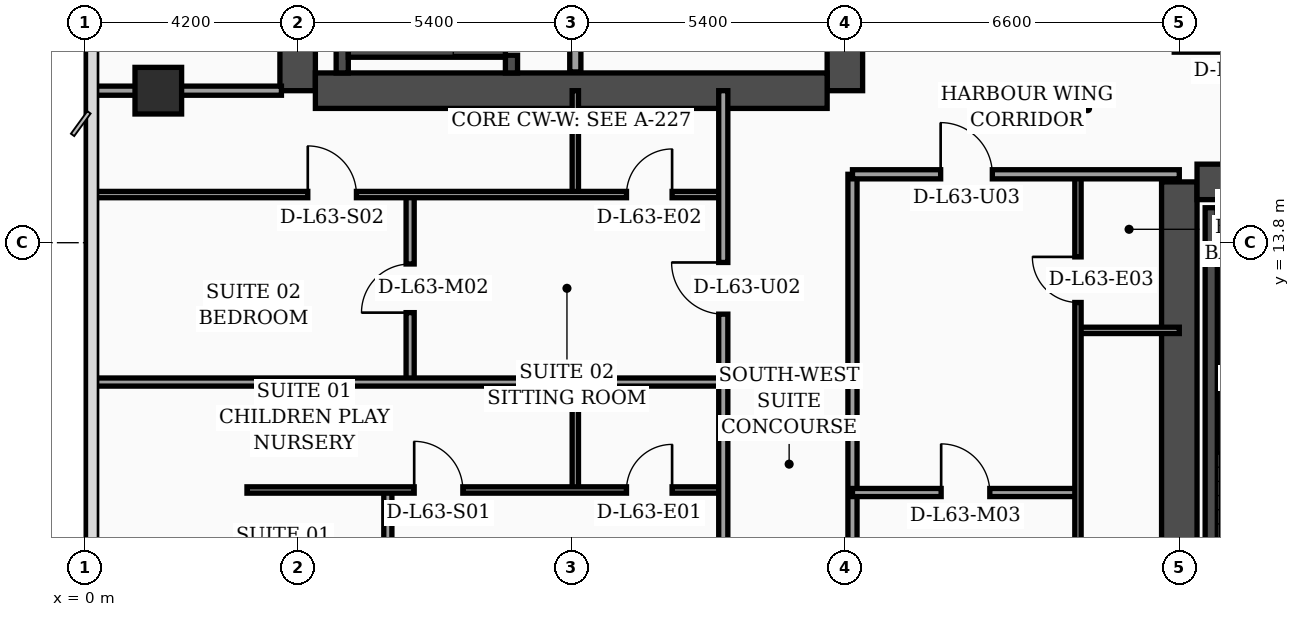
"""IFC4 building model, lengths in metres.
Left out: names, types, materials, properties, quantities, classifications, styles, units other than length and angle.
Written with IfcOpenShell. Run it as: python <this file> out.ifc"""

import sys

from ifc_helpers import new_model, si_unit, direction, frame, frame_2d, origin, origin_2d, place, context, subcontext, project, spatial, rectangle, extrude, element, fill, save


model = new_model("IFC4")
c1 = context("Model", 3, precision=1e-05, world=origin(), true_north=direction((0.0, 1.0)))
c2 = subcontext(c1, "Body", "Model", "MODEL_VIEW")
j1 = project(units=[si_unit("LENGTHUNIT", "METRE"), si_unit("PLANEANGLEUNIT", "RADIAN")], contexts=[c1])
p1 = place(None, origin())
s1 = spatial("IfcSite", under=j1, at=p1, CompositionType="ELEMENT")
p2 = place(p1, origin())
s2 = spatial("IfcBuilding", under=s1, at=p2, CompositionType="ELEMENT")
p3 = place(p2, frame((0.0, 0.0, 255.2)))
s3 = spatial("IfcBuildingStorey", under=s2, at=p3, CompositionType="ELEMENT", Elevation=255.2)
p4 = place(p3, frame((4.2, 16.8, 0.0), z_axis=(0.0, 0.0, 1.0), x_axis=(0.0, 1.0, 0.0)))
e1 = element("IfcWall", 1, at=p4, inside=s3, PredefinedType="SHEAR", context=c2, shape_type="SweptSolid", body=[
    extrude(rectangle(XDim=21.6, YDim=0.7, at=frame_2d((10.8, 0.0))), origin(), (0.0, 0.0, 1.0), 3.56),
])
p5 = place(p3, frame((15.0, 16.8, 0.0), z_axis=(0.0, 0.0, 1.0), x_axis=(0.0, 1.0, 0.0)))
e2 = element("IfcWall", 2, at=p5, inside=s3, PredefinedType="SHEAR", context=c2, shape_type="SweptSolid", body=[
    extrude(rectangle(XDim=21.6, YDim=0.7, at=frame_2d((10.8, 0.0))), origin(), (0.0, 0.0, 1.0), 3.56),
])
p6 = place(p5, frame((8.65, 0.0, 0.0)))
e3 = element("IfcOpeningElement", 3, at=p6, cuts=e2, PredefinedType="OPENING", context=c2, shape_type="SweptSolid", body=[
    extrude(rectangle(XDim=1.1, YDim=2.2, at=frame_2d((0.55, 1.1))), frame((0.0, 0.36, 0.0), z_axis=(0.0, -1.0, 0.0), x_axis=(1.0, 0.0, 0.0)), (0.0, 0.0, 1.0), 0.72),
])
p7 = place(p5, frame((18.9, 0.0, 0.0)))
e4 = element("IfcOpeningElement", 4, at=p7, cuts=e2, PredefinedType="OPENING", context=c2, shape_type="SweptSolid", body=[
    extrude(rectangle(XDim=1.1, YDim=2.2, at=frame_2d((0.55, 1.1))), frame((0.0, 0.36, 0.0), z_axis=(0.0, -1.0, 0.0), x_axis=(1.0, 0.0, 0.0)), (0.0, 0.0, 1.0), 0.72),
])
p8 = place(p3, frame((4.55, 16.8, 0.0), z_axis=(0.0, 0.0, 1.0), x_axis=(1.0, 0.0, 0.0)))
e5 = element("IfcWall", 5, at=p8, inside=s3, PredefinedType="SHEAR", context=c2, shape_type="SweptSolid", body=[
    extrude(rectangle(XDim=10.1, YDim=0.7, at=frame_2d((5.05, 0.0))), origin(), (0.0, 0.0, 1.0), 3.56),
])
p9 = place(p3, frame((21.6, 4.6, 0.0), z_axis=(0.0, 0.0, 1.0), x_axis=(0.0, 1.0, 0.0)))
e6 = element("IfcWall", 6, at=p9, inside=s3, PredefinedType="SHEAR", context=c2, shape_type="SweptSolid", body=[
    extrude(rectangle(XDim=10.4, YDim=0.7, at=frame_2d((5.2, 0.0))), origin(), (0.0, 0.0, 1.0), 3.56),
])
p10 = place(p3, frame((21.95, 15.0, 0.0), z_axis=(0.0, 0.0, 1.0), x_axis=(1.0, 0.0, 0.0)))
e7 = element("IfcWall", 7, at=p10, inside=s3, PredefinedType="SHEAR", context=c2, shape_type="SweptSolid", body=[
    extrude(rectangle(XDim=10.1, YDim=0.7, at=frame_2d((5.05, 0.0))), origin(), (0.0, 0.0, 1.0), 3.56),
])
p11 = place(p10, frame((4.95, 0.0, 0.0)))
e8 = element("IfcOpeningElement", 8, at=p11, cuts=e7, PredefinedType="OPENING", context=c2, shape_type="SweptSolid", body=[
    extrude(rectangle(XDim=1.1, YDim=2.2, at=frame_2d((0.55, 1.1))), frame((0.0, 0.36, 0.0), z_axis=(0.0, -1.0, 0.0), x_axis=(1.0, 0.0, 0.0)), (0.0, 0.0, 1.0), 0.72),
])
p12 = place(p3, frame((5.08, 17.15, 0.0), z_axis=(0.0, 0.0, 1.0), x_axis=(0.0, 1.0, 0.0)))
e9 = element("IfcWall", 9, at=p12, inside=s3, PredefinedType="SOLIDWALL", context=c2, shape_type="SweptSolid", body=[
    extrude(rectangle(XDim=9.64, YDim=0.24, at=frame_2d((4.82, 0.0))), origin(), (0.0, 0.0, 1.0), 3.56),
])
p13 = place(p3, frame((8.42, 17.15, 0.0), z_axis=(0.0, 0.0, 1.0), x_axis=(0.0, 1.0, 0.0)))
e10 = element("IfcWall", 10, at=p13, inside=s3, PredefinedType="SOLIDWALL", context=c2, shape_type="SweptSolid", body=[
    extrude(rectangle(XDim=9.64, YDim=0.24, at=frame_2d((4.82, 0.0))), origin(), (0.0, 0.0, 1.0), 3.56),
])
p14 = place(p13, frame((0.35, 0.0, 0.0)))
e11 = element("IfcOpeningElement", 11, at=p14, cuts=e10, PredefinedType="OPENING", context=c2, shape_type="SweptSolid", body=[
    extrude(rectangle(XDim=1.15, YDim=2.2, at=frame_2d((0.575, 1.1))), frame((0.0, 0.13, 0.0), z_axis=(0.0, -1.0, 0.0), x_axis=(1.0, 0.0, 0.0)), (0.0, 0.0, 1.0), 0.26),
])
p15 = place(p3, frame((5.2, 17.58, 0.0), z_axis=(0.0, 0.0, 1.0), x_axis=(1.0, 0.0, 0.0)))
e12 = element("IfcWall", 12, at=p15, inside=s3, PredefinedType="SOLIDWALL", context=c2, shape_type="SweptSolid", body=[
    extrude(rectangle(XDim=3.1, YDim=0.24, at=frame_2d((1.55, 0.0))), origin(), (0.0, 0.0, 1.0), 3.56),
])
p16 = place(p3, frame((22.23, 4.95, 0.0), z_axis=(0.0, 0.0, 1.0), x_axis=(0.0, 1.0, 0.0)))
e13 = element("IfcWall", 13, at=p16, inside=s3, PredefinedType="SOLIDWALL", context=c2, shape_type="SweptSolid", body=[
    extrude(rectangle(XDim=9.54, YDim=0.24, at=frame_2d((4.77, 0.0))), origin(), (0.0, 0.0, 1.0), 3.56),
])
p17 = place(p3, frame((22.35, 14.37, 0.0), z_axis=(0.0, 0.0, 1.0), x_axis=(1.0, 0.0, 0.0)))
e14 = element("IfcWall", 14, at=p17, inside=s3, PredefinedType="SOLIDWALL", context=c2, shape_type="SweptSolid", body=[
    extrude(rectangle(XDim=3.1, YDim=0.24, at=frame_2d((1.55, 0.0))), origin(), (0.0, 0.0, 1.0), 3.56),
])
p18 = place(p3, frame((1.45, 16.8, 0.0), z_axis=(0.0, 0.0, 1.0), x_axis=(1.0, 0.0, 0.0)))
e15 = element("IfcColumn", 15, at=p18, inside=s3, PredefinedType="COLUMN", context=c2, shape_type="SweptSolid", body=[
    extrude(rectangle(XDim=0.92, YDim=0.92, at=origin_2d()), origin(), (0.0, 0.0, 1.0), 3.56),
])
p19 = place(p3, frame((9.68, 17.17, 0.0), z_axis=(0.0, 0.0, 1.0), x_axis=(0.0, 1.0, 0.0)))
e16 = element("IfcWall", 16, at=p19, inside=s3, PredefinedType="SOLIDWALL", context=c2, shape_type="SweptSolid", body=[
    extrude(rectangle(XDim=7.83, YDim=0.22, at=frame_2d((3.915, 0.0))), origin(), (0.0, 0.0, 1.0), 3.56),
])
p20 = place(p3, frame((0.08, 16.8, 0.0), z_axis=(0.0, 0.0, 1.0), x_axis=(1.0, 0.0, 0.0)))
e17 = element("IfcWall", 17, at=p20, inside=s3, PredefinedType="PARTITIONING", context=c2, shape_type="SweptSolid", body=[
    extrude(rectangle(XDim=3.8, YDim=0.18, at=frame_2d((1.9, 0.0))), origin(), (0.0, 0.0, 1.0), 2.99),
])
p21 = place(p3, frame((9.68, 8.92, 0.0), z_axis=(0.0, 0.0, 1.0), x_axis=(0.0, 1.0, 0.0)))
e18 = element("IfcWall", 18, at=p21, inside=s3, PredefinedType="PARTITIONING", context=c2, shape_type="SweptSolid", body=[
    extrude(rectangle(XDim=2.13, YDim=0.125, at=frame_2d((1.065, 0.0))), origin(), (0.0, 0.0, 1.0), 3.09),
])
p22 = place(p3, frame((5.98, 2.44, 0.0), z_axis=(0.0, 0.0, 1.0), x_axis=(0.0, 1.0, 0.0)))
e19 = element("IfcWall", 19, at=p22, inside=s3, PredefinedType="PARTITIONING", context=c2, shape_type="SweptSolid", body=[
    extrude(rectangle(XDim=6.48, YDim=0.16, at=frame_2d((3.24, 0.0))), origin(), (0.0, 0.0, 1.0), 3.09),
])
p23 = place(p22, frame((2.76, 0.0, 0.0)))
e20 = element("IfcOpeningElement", 20, at=p23, cuts=e19, PredefinedType="OPENING", context=c2, shape_type="SweptSolid", body=[
    extrude(rectangle(XDim=0.96, YDim=2.2, at=frame_2d((0.48, 1.1))), frame((0.0, 0.09, 0.0), z_axis=(0.0, -1.0, 0.0), x_axis=(1.0, 0.0, 0.0)), (0.0, 0.0, 1.0), 0.18),
])
p24 = place(p3, frame((3.2, 8.92, 0.0), z_axis=(0.0, 0.0, 1.0), x_axis=(1.0, 0.0, 0.0)))
e21 = element("IfcWall", 21, at=p24, inside=s3, PredefinedType="PARTITIONING", context=c2, shape_type="SweptSolid", body=[
    extrude(rectangle(XDim=9.4, YDim=0.125, at=frame_2d((4.7, 0.0))), origin(), (0.0, 0.0, 1.0), 2.99),
])
p25 = place(p24, frame((3.3, 0.0, 0.0)))
e22 = element("IfcOpeningElement", 22, at=p25, cuts=e21, PredefinedType="OPENING", context=c2, shape_type="SweptSolid", body=[
    extrude(rectangle(XDim=0.96, YDim=2.2, at=frame_2d((0.48, 1.1))), frame((0.0, 0.073, 0.0), z_axis=(0.0, -1.0, 0.0), x_axis=(1.0, 0.0, 0.0)), (0.0, 0.0, 1.0), 0.145),
])
p26 = place(p24, frame((7.49, 0.0, 0.0)))
e23 = element("IfcOpeningElement", 23, at=p26, cuts=e21, PredefinedType="OPENING", context=c2, shape_type="SweptSolid", body=[
    extrude(rectangle(XDim=0.9, YDim=2.15, at=frame_2d((0.45, 1.075))), frame((0.0, 0.073, 0.0), z_axis=(0.0, -1.0, 0.0), x_axis=(1.0, 0.0, 0.0)), (0.0, 0.0, 1.0), 0.145),
])
p27 = place(p3, frame((9.68, 14.75, 0.0), z_axis=(0.0, 0.0, 1.0), x_axis=(0.0, 1.0, 0.0)))
e24 = element("IfcWall", 24, at=p27, inside=s3, PredefinedType="PARTITIONING", context=c2, shape_type="SweptSolid", body=[
    extrude(rectangle(XDim=2.05, YDim=0.125, at=frame_2d((1.025, 0.0))), origin(), (0.0, 0.0, 1.0), 3.56),
])
p28 = place(p3, frame((6.42, 11.05, 0.0), z_axis=(0.0, 0.0, 1.0), x_axis=(0.0, 1.0, 0.0)))
e25 = element("IfcWall", 25, at=p28, inside=s3, PredefinedType="PARTITIONING", context=c2, shape_type="SweptSolid", body=[
    extrude(rectangle(XDim=3.7, YDim=0.16, at=frame_2d((1.85, 0.0))), origin(), (0.0, 0.0, 1.0), 3.56),
])
p29 = place(p28, frame((1.37, 0.0, 0.0)))
e26 = element("IfcOpeningElement", 26, at=p29, cuts=e25, PredefinedType="OPENING", context=c2, shape_type="SweptSolid", body=[
    extrude(rectangle(XDim=0.96, YDim=2.2, at=frame_2d((0.48, 1.1))), frame((0.0, 0.09, 0.0), z_axis=(0.0, -1.0, 0.0), x_axis=(1.0, 0.0, 0.0)), (0.0, 0.0, 1.0), 0.18),
])
p30 = place(p3, frame((0.08, 14.75, 0.0), z_axis=(0.0, 0.0, 1.0), x_axis=(1.0, 0.0, 0.0)))
e27 = element("IfcWall", 27, at=p30, inside=s3, PredefinedType="PARTITIONING", context=c2, shape_type="SweptSolid", body=[
    extrude(rectangle(XDim=12.52, YDim=0.125, at=frame_2d((6.26, 0.0))), origin(), (0.0, 0.0, 1.0), 2.99),
])
p31 = place(p30, frame((4.32, 0.0, 0.0)))
e28 = element("IfcOpeningElement", 28, at=p31, cuts=e27, PredefinedType="OPENING", context=c2, shape_type="SweptSolid", body=[
    extrude(rectangle(XDim=0.96, YDim=2.2, at=frame_2d((0.48, 1.1))), frame((0.0, 0.073, 0.0), z_axis=(0.0, -1.0, 0.0), x_axis=(1.0, 0.0, 0.0)), (0.0, 0.0, 1.0), 0.145),
])
p32 = place(p30, frame((10.61, 0.0, 0.0)))
e29 = element("IfcOpeningElement", 29, at=p32, cuts=e27, PredefinedType="OPENING", context=c2, shape_type="SweptSolid", body=[
    extrude(rectangle(XDim=0.9, YDim=2.15, at=frame_2d((0.45, 1.075))), frame((0.0, 0.073, 0.0), z_axis=(0.0, -1.0, 0.0), x_axis=(1.0, 0.0, 0.0)), (0.0, 0.0, 1.0), 0.145),
])
p33 = place(p3, frame((0.08, 11.05, 0.0), z_axis=(0.0, 0.0, 1.0), x_axis=(1.0, 0.0, 0.0)))
e30 = element("IfcWall", 30, at=p33, inside=s3, PredefinedType="PARTITIONING", context=c2, shape_type="SweptSolid", body=[
    extrude(rectangle(XDim=12.52, YDim=0.16, at=frame_2d((6.26, 0.0))), origin(), (0.0, 0.0, 1.0), 2.99),
])
p34 = place(p3, frame((12.6, 2.44, 0.0), z_axis=(0.0, 0.0, 1.0), x_axis=(0.0, 1.0, 0.0)))
e31 = element("IfcWall", 31, at=p34, inside=s3, PredefinedType="PARTITIONING", context=c2, shape_type="SweptSolid", body=[
    extrude(rectangle(XDim=14.36, YDim=0.18, at=frame_2d((7.18, 0.0))), origin(), (0.0, 0.0, 1.0), 2.99),
])
p35 = place(p34, frame((3.01, 0.0, 0.0)))
e32 = element("IfcOpeningElement", 32, at=p35, cuts=e31, PredefinedType="OPENING", context=c2, shape_type="SweptSolid", body=[
    extrude(rectangle(XDim=1.02, YDim=2.2, at=frame_2d((0.51, 1.1))), frame((0.0, 0.1, 0.0), z_axis=(0.0, -1.0, 0.0), x_axis=(1.0, 0.0, 0.0)), (0.0, 0.0, 1.0), 0.2),
])
p36 = place(p34, frame((9.95, 0.0, 0.0)))
e33 = element("IfcOpeningElement", 33, at=p36, cuts=e31, PredefinedType="OPENING", context=c2, shape_type="SweptSolid", body=[
    extrude(rectangle(XDim=1.02, YDim=2.2, at=frame_2d((0.51, 1.1))), frame((0.0, 0.1, 0.0), z_axis=(0.0, -1.0, 0.0), x_axis=(1.0, 0.0, 0.0)), (0.0, 0.0, 1.0), 0.2),
])
p37 = place(p3, frame((15.15, 2.44, 0.0), z_axis=(0.0, 0.0, 1.0), x_axis=(0.0, 1.0, 0.0)))
e34 = element("IfcWall", 34, at=p37, inside=s3, PredefinedType="PARTITIONING", context=c2, shape_type="SweptSolid", body=[
    extrude(rectangle(XDim=12.71, YDim=0.18, at=frame_2d((6.355, 0.0))), origin(), (0.0, 0.0, 1.0), 3.09),
])
p38 = place(p3, frame((19.6, 12.07, 0.0), z_axis=(0.0, 0.0, 1.0), x_axis=(1.0, 0.0, 0.0)))
e35 = element("IfcWall", 35, at=p38, inside=s3, PredefinedType="PARTITIONING", context=c2, shape_type="SweptSolid", body=[
    extrude(rectangle(XDim=2.0, YDim=0.125, at=frame_2d((1.0, 0.0))), origin(), (0.0, 0.0, 1.0), 3.56),
])
p39 = place(p3, frame((15.15, 8.87, 0.0), z_axis=(0.0, 0.0, 1.0), x_axis=(1.0, 0.0, 0.0)))
e36 = element("IfcWall", 36, at=p39, inside=s3, PredefinedType="PARTITIONING", context=c2, shape_type="SweptSolid", body=[
    extrude(rectangle(XDim=4.45, YDim=0.16, at=frame_2d((2.225, 0.0))), origin(), (0.0, 0.0, 1.0), 3.56),
])
p40 = place(p39, frame((1.75, 0.0, 0.0)))
e37 = element("IfcOpeningElement", 37, at=p40, cuts=e36, PredefinedType="OPENING", context=c2, shape_type="SweptSolid", body=[
    extrude(rectangle(XDim=0.96, YDim=2.2, at=frame_2d((0.48, 1.1))), frame((0.0, 0.09, 0.0), z_axis=(0.0, -1.0, 0.0), x_axis=(1.0, 0.0, 0.0)), (0.0, 0.0, 1.0), 0.18),
])
p41 = place(p3, frame((19.6, 2.44, 0.0), z_axis=(0.0, 0.0, 1.0), x_axis=(0.0, 1.0, 0.0)))
e38 = element("IfcWall", 38, at=p41, inside=s3, PredefinedType="PARTITIONING", context=c2, shape_type="SweptSolid", body=[
    extrude(rectangle(XDim=12.71, YDim=0.125, at=frame_2d((6.355, 0.0))), origin(), (0.0, 0.0, 1.0), 2.59),
])
p42 = place(p41, frame((4.34, 0.0, 0.0)))
e39 = element("IfcOpeningElement", 39, at=p42, cuts=e38, PredefinedType="OPENING", context=c2, shape_type="SweptSolid", body=[
    extrude(rectangle(XDim=0.96, YDim=2.2, at=frame_2d((0.48, 1.1))), frame((0.0, 0.073, 0.0), z_axis=(0.0, -1.0, 0.0), x_axis=(1.0, 0.0, 0.0)), (0.0, 0.0, 1.0), 0.145),
])
p43 = place(p41, frame((10.18, 0.0, 0.0)))
e40 = element("IfcOpeningElement", 40, at=p43, cuts=e38, PredefinedType="OPENING", context=c2, shape_type="SweptSolid", body=[
    extrude(rectangle(XDim=0.9, YDim=2.15, at=frame_2d((0.45, 1.075))), frame((0.0, 0.073, 0.0), z_axis=(0.0, -1.0, 0.0), x_axis=(1.0, 0.0, 0.0)), (0.0, 0.0, 1.0), 0.145),
])
p44 = place(p3, frame((15.15, 15.15, 0.0), z_axis=(0.0, 0.0, 1.0), x_axis=(1.0, 0.0, 0.0)))
e41 = element("IfcWall", 41, at=p44, inside=s3, PredefinedType="PARTITIONING", context=c2, shape_type="SweptSolid", body=[
    extrude(rectangle(XDim=6.45, YDim=0.18, at=frame_2d((3.225, 0.0))), origin(), (0.0, 0.0, 1.0), 2.59),
])
p45 = place(p44, frame((1.74, 0.0, 0.0)))
e42 = element("IfcOpeningElement", 42, at=p45, cuts=e41, PredefinedType="OPENING", context=c2, shape_type="SweptSolid", body=[
    extrude(rectangle(XDim=1.02, YDim=2.2, at=frame_2d((0.51, 1.1))), frame((0.0, 0.1, 0.0), z_axis=(0.0, -1.0, 0.0), x_axis=(1.0, 0.0, 0.0)), (0.0, 0.0, 1.0), 0.2),
])
p46 = place(p3, frame((21.5, 17.65, 0.0), z_axis=(0.0, 0.0, 1.0), x_axis=(1.0, 0.0, 0.0)))
e43 = element("IfcWall", 43, at=p46, inside=s3, PredefinedType="PARTITIONING", context=c2, shape_type="SweptSolid", body=[
    extrude(rectangle(XDim=6.9, YDim=0.18, at=frame_2d((3.45, 0.0))), origin(), (0.0, 0.0, 1.0), 2.99),
])
p47 = place(p46, frame((0.95, 0.0, 0.0)))
e44 = element("IfcOpeningElement", 44, at=p47, cuts=e43, PredefinedType="OPENING", context=c2, shape_type="SweptSolid", body=[
    extrude(rectangle(XDim=1.02, YDim=2.2, at=frame_2d((0.51, 1.1))), frame((0.0, 0.1, 0.0), z_axis=(0.0, -1.0, 0.0), x_axis=(1.0, 0.0, 0.0)), (0.0, 0.0, 1.0), 0.2),
])
p48 = place(p25, origin())
e45 = element("IfcDoor", 45, at=p48, inside=s3, OperationType="SINGLE_SWING_LEFT", PredefinedType="DOOR", context=c2, shape_type="SweptSolid", body=[
    extrude(rectangle(XDim=0.96, YDim=2.2, at=frame_2d((0.48, 1.1))), frame((0.0, 0.025, 0.0), z_axis=(0.0, -1.0, 0.0), x_axis=(1.0, 0.0, 0.0)), (0.0, 0.0, 1.0), 0.05),
])
fill(e22, e45)
p49 = place(p26, origin())
e46 = element("IfcDoor", 46, at=p49, inside=s3, OperationType="SINGLE_SWING_RIGHT", PredefinedType="DOOR", context=c2, shape_type="SweptSolid", body=[
    extrude(rectangle(XDim=0.9, YDim=2.15, at=frame_2d((0.45, 1.075))), frame((0.0, 0.025, 0.0), z_axis=(0.0, -1.0, 0.0), x_axis=(1.0, 0.0, 0.0)), (0.0, 0.0, 1.0), 0.05),
])
fill(e23, e46)
p50 = place(p29, origin())
e47 = element("IfcDoor", 47, at=p50, inside=s3, OperationType="SINGLE_SWING_LEFT", PredefinedType="DOOR", context=c2, shape_type="SweptSolid", body=[
    extrude(rectangle(XDim=0.96, YDim=2.2, at=frame_2d((0.48, 1.1))), frame((0.0, 0.025, 0.0), z_axis=(0.0, -1.0, 0.0), x_axis=(1.0, 0.0, 0.0)), (0.0, 0.0, 1.0), 0.05),
])
fill(e26, e47)
p51 = place(p31, origin())
e48 = element("IfcDoor", 48, at=p51, inside=s3, OperationType="SINGLE_SWING_LEFT", PredefinedType="DOOR", context=c2, shape_type="SweptSolid", body=[
    extrude(rectangle(XDim=0.96, YDim=2.2, at=frame_2d((0.48, 1.1))), frame((0.0, 0.025, 0.0), z_axis=(0.0, -1.0, 0.0), x_axis=(1.0, 0.0, 0.0)), (0.0, 0.0, 1.0), 0.05),
])
fill(e28, e48)
p52 = place(p32, origin())
e49 = element("IfcDoor", 49, at=p52, inside=s3, OperationType="SINGLE_SWING_RIGHT", PredefinedType="DOOR", context=c2, shape_type="SweptSolid", body=[
    extrude(rectangle(XDim=0.9, YDim=2.15, at=frame_2d((0.45, 1.075))), frame((0.0, 0.025, 0.0), z_axis=(0.0, -1.0, 0.0), x_axis=(1.0, 0.0, 0.0)), (0.0, 0.0, 1.0), 0.05),
])
fill(e29, e49)
p53 = place(p36, origin())
e50 = element("IfcDoor", 50, at=p53, inside=s3, OperationType="SINGLE_SWING_RIGHT", PredefinedType="DOOR", context=c2, shape_type="SweptSolid", body=[
    extrude(rectangle(XDim=1.02, YDim=2.2, at=frame_2d((0.51, 1.1))), frame((0.0, 0.025, 0.0), z_axis=(0.0, -1.0, 0.0), x_axis=(1.0, 0.0, 0.0)), (0.0, 0.0, 1.0), 0.05),
])
fill(e33, e50)
p54 = place(p40, origin())
e51 = element("IfcDoor", 51, at=p54, inside=s3, OperationType="SINGLE_SWING_LEFT", PredefinedType="DOOR", context=c2, shape_type="SweptSolid", body=[
    extrude(rectangle(XDim=0.96, YDim=2.2, at=frame_2d((0.48, 1.1))), frame((0.0, 0.025, 0.0), z_axis=(0.0, -1.0, 0.0), x_axis=(1.0, 0.0, 0.0)), (0.0, 0.0, 1.0), 0.05),
])
fill(e37, e51)
p55 = place(p43, origin())
e52 = element("IfcDoor", 52, at=p55, inside=s3, OperationType="SINGLE_SWING_RIGHT", PredefinedType="DOOR", context=c2, shape_type="SweptSolid", body=[
    extrude(rectangle(XDim=0.9, YDim=2.15, at=frame_2d((0.45, 1.075))), frame((0.0, 0.025, 0.0), z_axis=(0.0, -1.0, 0.0), x_axis=(1.0, 0.0, 0.0)), (0.0, 0.0, 1.0), 0.05),
])
fill(e40, e52)
p56 = place(p45, origin())
e53 = element("IfcDoor", 53, at=p56, inside=s3, OperationType="SINGLE_SWING_LEFT", PredefinedType="DOOR", context=c2, shape_type="SweptSolid", body=[
    extrude(rectangle(XDim=1.02, YDim=2.2, at=frame_2d((0.51, 1.1))), frame((0.0, 0.025, 0.0), z_axis=(0.0, -1.0, 0.0), x_axis=(1.0, 0.0, 0.0)), (0.0, 0.0, 1.0), 0.05),
])
fill(e42, e53)
p57 = place(p14, origin())
e54 = element("IfcDoor", 54, at=p57, inside=s3, OperationType="SINGLE_SWING_LEFT", PredefinedType="DOOR", context=c2, shape_type="SweptSolid", body=[
    extrude(rectangle(XDim=1.15, YDim=2.2, at=frame_2d((0.575, 1.1))), frame((0.0, 0.025, 0.0), z_axis=(0.0, -1.0, 0.0), x_axis=(1.0, 0.0, 0.0)), (0.0, 0.0, 1.0), 0.05),
])
fill(e11, e54)
save(model, sys.argv[1])
